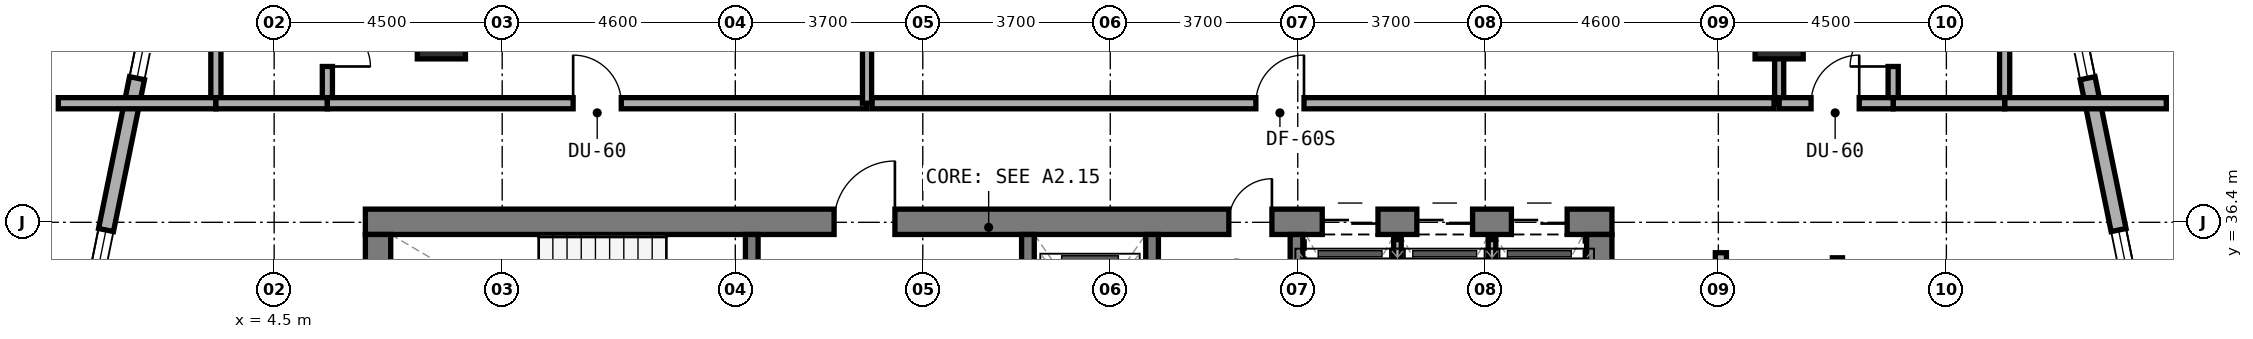
"""IFC4 building model, lengths in metres.
Left out: names, types, materials, properties, quantities, classifications, styles, units other than length and angle.
Written with IfcOpenShell. Run it as: python <this file> out.ifc"""

import sys

from ifc_helpers import new_model, si_unit, direction, frame, frame_2d, origin, origin_2d, place, context, subcontext, project, spatial, rectangle, extrude, element, fill, save


model = new_model("IFC4")
c1 = context("Model", 3, precision=1e-05, world=origin(), true_north=direction((0.0, 1.0)))
c2 = subcontext(c1, "Body", "Model", "MODEL_VIEW")
j1 = project(units=[si_unit("LENGTHUNIT", "METRE"), si_unit("PLANEANGLEUNIT", "RADIAN")], contexts=[c1])
p1 = place(None, origin())
s1 = spatial("IfcSite", under=j1, at=p1, CompositionType="ELEMENT")
p2 = place(p1, origin())
s2 = spatial("IfcBuilding", under=s1, at=p2, CompositionType="ELEMENT")
p3 = place(p2, frame((0.0, 0.0, 59.0)))
s3 = spatial("IfcBuildingStorey", under=s2, at=p3, CompositionType="ELEMENT", Elevation=59.0)
p4 = place(p3, frame((6.3, 36.41, 0.0), z_axis=(0.0, 0.0, 1.0), x_axis=(1.0, 0.0, 0.0)))
e1 = element("IfcWall", 1, at=p4, inside=s3, PredefinedType="SHEAR", context=c2, shape_type="SweptSolid", body=[
    extrude(rectangle(XDim=24.6, YDim=0.5, at=frame_2d((12.3, 0.0))), origin(), (0.0, 0.0, 1.0), 3.5),
])
p5 = place(p4, frame((9.25, 0.0, 0.0)))
e2 = element("IfcOpeningElement", 2, at=p5, cuts=e1, PredefinedType="OPENING", context=c2, shape_type="SweptSolid", body=[
    extrude(rectangle(XDim=1.2, YDim=2.15, at=frame_2d((0.6, 1.075))), frame((0.0, 0.26, 0.0), z_axis=(0.0, -1.0, 0.0), x_axis=(1.0, 0.0, 0.0)), (0.0, 0.0, 1.0), 0.52),
])
p6 = place(p4, frame((17.04, 0.0, 0.0)))
e3 = element("IfcOpeningElement", 3, at=p6, cuts=e1, PredefinedType="OPENING", context=c2, shape_type="SweptSolid", body=[
    extrude(rectangle(XDim=0.85, YDim=2.1, at=frame_2d((0.425, 1.05))), frame((0.0, 0.26, 0.0), z_axis=(0.0, -1.0, 0.0), x_axis=(1.0, 0.0, 0.0)), (0.0, 0.0, 1.0), 0.52),
])
p7 = place(p4, frame((18.883, 0.0, 0.0)))
e4 = element("IfcOpeningElement", 4, at=p7, cuts=e1, PredefinedType="OPENING", context=c2, shape_type="SweptSolid", body=[
    extrude(rectangle(XDim=1.1, YDim=2.15, at=frame_2d((0.55, 1.075))), frame((0.0, 0.26, 0.0), z_axis=(0.0, -1.0, 0.0), x_axis=(1.0, 0.0, 0.0)), (0.0, 0.0, 1.0), 0.52),
])
p8 = place(p4, frame((20.75, 0.0, 0.0)))
e5 = element("IfcOpeningElement", 5, at=p8, cuts=e1, PredefinedType="OPENING", context=c2, shape_type="SweptSolid", body=[
    extrude(rectangle(XDim=1.1, YDim=2.15, at=frame_2d((0.55, 1.075))), frame((0.0, 0.26, 0.0), z_axis=(0.0, -1.0, 0.0), x_axis=(1.0, 0.0, 0.0)), (0.0, 0.0, 1.0), 0.52),
])
p9 = place(p4, frame((22.616, 0.0, 0.0)))
e6 = element("IfcOpeningElement", 6, at=p9, cuts=e1, PredefinedType="OPENING", context=c2, shape_type="SweptSolid", body=[
    extrude(rectangle(XDim=1.1, YDim=2.15, at=frame_2d((0.55, 1.075))), frame((0.0, 0.26, 0.0), z_axis=(0.0, -1.0, 0.0), x_axis=(1.0, 0.0, 0.0)), (0.0, 0.0, 1.0), 0.52),
])
for number, where, z_axis, x_axis in (
    (7, (6.55, 33.0, 0.0), (0.0, 0.0, 1.0), (0.0, 1.0, 0.0)),
    (8, (30.65, 33.0, 0.0), (0.0, 0.0, 1.0), (0.0, 1.0, 0.0)),
):
    element("IfcWall", number, at=place(p3, frame(where, z_axis=z_axis, x_axis=x_axis)), inside=s3, PredefinedType="SHEAR", context=c2, shape_type="SweptSolid", body=[
        extrude(rectangle(XDim=3.16, YDim=0.5, at=frame_2d((1.58, 0.0))), origin(), (0.0, 0.0, 1.0), 3.5),
    ])
p10 = place(p3, frame((13.925, 33.0, 0.0), z_axis=(0.0, 0.0, 1.0), x_axis=(0.0, 1.0, 0.0)))
e9 = element("IfcWall", 9, at=p10, inside=s3, PredefinedType="STANDARD", context=c2, shape_type="SweptSolid", body=[
    extrude(rectangle(XDim=3.16, YDim=0.25, at=frame_2d((1.58, 0.0))), origin(), (0.0, 0.0, 1.0), 3.22),
])
p11 = place(p10, frame((0.98, 0.0, 0.0)))
e10 = element("IfcOpeningElement", 10, at=p11, cuts=e9, PredefinedType="OPENING", context=c2, shape_type="SweptSolid", body=[
    extrude(rectangle(XDim=1.1, YDim=2.15, at=frame_2d((0.55, 1.075))), frame((0.0, 0.135, 0.0), z_axis=(0.0, -1.0, 0.0), x_axis=(1.0, 0.0, 0.0)), (0.0, 0.0, 1.0), 0.27),
])
p12 = place(p3, frame((19.375, 33.0, 0.0), z_axis=(0.0, 0.0, 1.0), x_axis=(0.0, 1.0, 0.0)))
e11 = element("IfcWall", 11, at=p12, inside=s3, PredefinedType="STANDARD", context=c2, shape_type="SweptSolid", body=[
    extrude(rectangle(XDim=3.16, YDim=0.25, at=frame_2d((1.58, 0.0))), origin(), (0.0, 0.0, 1.0), 3.22),
])
p13 = place(p12, frame((0.98, 0.0, 0.0)))
e12 = element("IfcOpeningElement", 12, at=p13, cuts=e11, PredefinedType="OPENING", context=c2, shape_type="SweptSolid", body=[
    extrude(rectangle(XDim=1.1, YDim=2.15, at=frame_2d((0.55, 1.075))), frame((0.0, 0.135, 0.0), z_axis=(0.0, -1.0, 0.0), x_axis=(1.0, 0.0, 0.0)), (0.0, 0.0, 1.0), 0.27),
])
for number, where, z_axis, x_axis in (
    (13, (21.825, 33.0, 0.0), (0.0, 0.0, 1.0), (0.0, 1.0, 0.0)),
    (14, (24.675, 33.0, 0.0), (0.0, 0.0, 1.0), (0.0, 1.0, 0.0)),
):
    element("IfcWall", number, at=place(p3, frame(where, z_axis=z_axis, x_axis=x_axis)), inside=s3, PredefinedType="STANDARD", context=c2, shape_type="SweptSolid", body=[
        extrude(rectangle(XDim=3.16, YDim=0.25, at=frame_2d((1.58, 0.0))), origin(), (0.0, 0.0, 1.0), 3.22),
    ])
for number, where, z_axis, x_axis in (
    (15, (34.2, 40.2, 0.0), (0.0, 0.0, 1.0), (1.0, 0.0, 0.0)),
    (16, (7.8, 40.2, 0.0), (0.0, 0.0, 1.0), (1.0, 0.0, 0.0)),
):
    element("IfcColumn", number, at=place(p3, frame(where, z_axis=z_axis, x_axis=x_axis)), inside=s3, PredefinedType="COLUMN", context=c2, shape_type="SweptSolid", body=[
        extrude(rectangle(XDim=0.95, YDim=1.15, at=origin_2d()), origin(), (0.0, 0.0, 1.0), 3.5),
    ])
p14 = place(p3, frame((41.864, 31.516, 0.0), z_axis=(0.0, 0.0, 1.0), x_axis=(-0.199990901713, 0.979797754249, 0.0)))
e17 = element("IfcWall", 17, at=p14, inside=s3, PredefinedType="STANDARD", context=c2, shape_type="SweptSolid", body=[
    extrude(rectangle(XDim=10.065, YDim=0.3, at=frame_2d((5.033, 0.0))), origin(), (0.0, 0.0, 1.0), 3.22),
])
p15 = place(p14, frame((2.429, 0.0, 0.8)))
e18 = element("IfcOpeningElement", 18, at=p15, cuts=e17, PredefinedType="OPENING", context=c2, shape_type="SweptSolid", body=[
    extrude(rectangle(XDim=2.4, YDim=1.6, at=frame_2d((1.2, 0.8))), frame((0.0, 0.16, 0.0), z_axis=(0.0, -1.0, 0.0), x_axis=(1.0, 0.0, 0.0)), (0.0, 0.0, 1.0), 0.32),
])
p16 = place(p14, frame((7.887, 0.0, 0.85)))
e19 = element("IfcOpeningElement", 19, at=p16, cuts=e17, PredefinedType="OPENING", context=c2, shape_type="SweptSolid", body=[
    extrude(rectangle(XDim=1.8, YDim=1.5, at=frame_2d((0.9, 0.75))), frame((0.0, 0.16, 0.0), z_axis=(0.0, -1.0, 0.0), x_axis=(1.0, 0.0, 0.0)), (0.0, 0.0, 1.0), 0.32),
])
p17 = place(p3, frame((2.229, 41.378, 0.0), z_axis=(0.0, 0.0, 1.0), x_axis=(-0.199990901713, -0.979797754249, 0.0)))
e20 = element("IfcWall", 20, at=p17, inside=s3, PredefinedType="STANDARD", context=c2, shape_type="SweptSolid", body=[
    extrude(rectangle(XDim=10.065, YDim=0.3, at=frame_2d((5.033, 0.0))), origin(), (0.0, 0.0, 1.0), 3.22),
])
p18 = place(p17, frame((0.378, 0.0, 0.85)))
e21 = element("IfcOpeningElement", 21, at=p18, cuts=e20, PredefinedType="OPENING", context=c2, shape_type="SweptSolid", body=[
    extrude(rectangle(XDim=1.8, YDim=1.5, at=frame_2d((0.9, 0.75))), frame((0.0, 0.16, 0.0), z_axis=(0.0, -1.0, 0.0), x_axis=(1.0, 0.0, 0.0)), (0.0, 0.0, 1.0), 0.32),
])
p19 = place(p17, frame((5.236, 0.0, 0.8)))
e22 = element("IfcOpeningElement", 22, at=p19, cuts=e20, PredefinedType="OPENING", context=c2, shape_type="SweptSolid", body=[
    extrude(rectangle(XDim=2.4, YDim=1.6, at=frame_2d((1.2, 0.8))), frame((0.0, 0.16, 0.0), z_axis=(0.0, -1.0, 0.0), x_axis=(1.0, 0.0, 0.0)), (0.0, 0.0, 1.0), 0.32),
])
p20 = place(p3, frame((26.667, 33.1, 0.0), z_axis=(0.0, 0.0, 1.0), x_axis=(0.0, 1.0, 0.0)))
e23 = element("IfcWall", 23, at=p20, inside=s3, PredefinedType="PARTITIONING", context=c2, shape_type="SweptSolid", body=[
    extrude(rectangle(XDim=2.96, YDim=0.15, at=frame_2d((1.48, 0.0))), origin(), (0.0, 0.0, 1.0), 3.22),
])
p21 = place(p3, frame((28.533, 33.1, 0.0), z_axis=(0.0, 0.0, 1.0), x_axis=(0.0, 1.0, 0.0)))
e24 = element("IfcWall", 24, at=p21, inside=s3, PredefinedType="PARTITIONING", context=c2, shape_type="SweptSolid", body=[
    extrude(rectangle(XDim=2.96, YDim=0.15, at=frame_2d((1.48, 0.0))), origin(), (0.0, 0.0, 1.0), 2.495),
])
p22 = place(p3, frame((5.55, 38.85, 0.0), z_axis=(0.0, 0.0, 1.0), x_axis=(0.0, 1.0, 0.0)))
e25 = element("IfcWall", 25, at=p22, inside=s3, PredefinedType="PLUMBINGWALL", context=c2, shape_type="SweptSolid", body=[
    extrude(rectangle(XDim=2.1, YDim=0.2, at=frame_2d((1.05, 0.0))), origin(), (0.0, 0.0, 1.0), 3.22),
])
p23 = place(p22, frame((0.625, 0.0, 0.0)))
e26 = element("IfcOpeningElement", 26, at=p23, cuts=e25, PredefinedType="OPENING", context=c2, shape_type="SweptSolid", body=[
    extrude(rectangle(XDim=0.85, YDim=2.1, at=frame_2d((0.425, 1.05))), frame((0.0, 0.11, 0.0), z_axis=(0.0, -1.0, 0.0), x_axis=(1.0, 0.0, 0.0)), (0.0, 0.0, 1.0), 0.22),
])
p24 = place(p3, frame((3.35, 38.85, 0.0), z_axis=(0.0, 0.0, 1.0), x_axis=(0.0, 1.0, 0.0)))
e27 = element("IfcWall", 27, at=p24, inside=s3, PredefinedType="PLUMBINGWALL", context=c2, shape_type="SweptSolid", body=[
    extrude(rectangle(XDim=2.1, YDim=0.2, at=frame_2d((1.05, 0.0))), origin(), (0.0, 0.0, 1.0), 3.22),
])
p25 = place(p3, frame((0.24, 38.75, 0.0), z_axis=(0.0, 0.0, 1.0), x_axis=(1.0, 0.0, 0.0)))
e28 = element("IfcWall", 28, at=p25, inside=s3, PredefinedType="SOLIDWALL", context=c2, shape_type="SweptSolid", body=[
    extrude(rectangle(XDim=3.11, YDim=0.22, at=frame_2d((1.555, 0.0))), origin(), (0.0, 0.0, 1.0), 3.22),
])
p26 = place(p3, frame((3.35, 38.75, 0.0), z_axis=(0.0, 0.0, 1.0), x_axis=(1.0, 0.0, 0.0)))
e29 = element("IfcWall", 29, at=p26, inside=s3, PredefinedType="SOLIDWALL", context=c2, shape_type="SweptSolid", body=[
    extrude(rectangle(XDim=2.2, YDim=0.22, at=frame_2d((1.1, 0.0))), origin(), (0.0, 0.0, 1.0), 3.22),
])
p27 = place(p3, frame((5.55, 38.75, 0.0), z_axis=(0.0, 0.0, 1.0), x_axis=(1.0, 0.0, 0.0)))
e30 = element("IfcWall", 30, at=p27, inside=s3, PredefinedType="SOLIDWALL", context=c2, shape_type="SweptSolid", body=[
    extrude(rectangle(XDim=10.65, YDim=0.22, at=frame_2d((5.325, 0.0))), origin(), (0.0, 0.0, 1.0), 2.495),
])
p28 = place(p27, frame((4.85, 0.0, 0.0)))
e31 = element("IfcOpeningElement", 31, at=p28, cuts=e30, PredefinedType="OPENING", context=c2, shape_type="SweptSolid", body=[
    extrude(rectangle(XDim=0.95, YDim=2.1, at=frame_2d((0.475, 1.05))), frame((0.0, 0.12, 0.0), z_axis=(0.0, -1.0, 0.0), x_axis=(1.0, 0.0, 0.0)), (0.0, 0.0, 1.0), 0.24),
])
p29 = place(p3, frame((16.2, 38.75, 0.0), z_axis=(0.0, 0.0, 1.0), x_axis=(0.0, 1.0, 0.0)))
e32 = element("IfcWall", 32, at=p29, inside=s3, PredefinedType="SOLIDWALL", context=c2, shape_type="SweptSolid", body=[
    extrude(rectangle(XDim=8.19, YDim=0.18, at=frame_2d((4.095, 0.0))), origin(), (0.0, 0.0, 1.0), 2.495),
])
p30 = place(p3, frame((16.3, 38.75, 0.0), z_axis=(0.0, 0.0, 1.0), x_axis=(1.0, 0.0, 0.0)))
e33 = element("IfcWall", 33, at=p30, inside=s3, PredefinedType="SOLIDWALL", context=c2, shape_type="SweptSolid", body=[
    extrude(rectangle(XDim=17.8, YDim=0.22, at=frame_2d((8.9, 0.0))), origin(), (0.0, 0.0, 1.0), 2.495),
])
p31 = place(p30, frame((7.573, 0.0, 0.0)))
e34 = element("IfcOpeningElement", 34, at=p31, cuts=e33, PredefinedType="OPENING", context=c2, shape_type="SweptSolid", body=[
    extrude(rectangle(XDim=0.95, YDim=2.1, at=frame_2d((0.475, 1.05))), frame((0.0, 0.12, 0.0), z_axis=(0.0, -1.0, 0.0), x_axis=(1.0, 0.0, 0.0)), (0.0, 0.0, 1.0), 0.24),
])
p32 = place(p3, frame((34.2, 38.75, 0.0), z_axis=(0.0, 0.0, 1.0), x_axis=(0.0, 1.0, 0.0)))
e35 = element("IfcWall", 35, at=p32, inside=s3, PredefinedType="SOLIDWALL", context=c2, shape_type="SweptSolid", body=[
    extrude(rectangle(XDim=6.674, YDim=0.18, at=frame_2d((3.337, 0.0))), origin(), (0.0, 0.0, 1.0), 2.495),
])
p33 = place(p3, frame((36.45, 38.85, 0.0), z_axis=(0.0, 0.0, 1.0), x_axis=(0.0, 1.0, 0.0)))
e36 = element("IfcWall", 36, at=p33, inside=s3, PredefinedType="PLUMBINGWALL", context=c2, shape_type="SweptSolid", body=[
    extrude(rectangle(XDim=2.1, YDim=0.2, at=frame_2d((1.05, 0.0))), origin(), (0.0, 0.0, 1.0), 3.22),
])
p34 = place(p33, frame((0.625, 0.0, 0.0)))
e37 = element("IfcOpeningElement", 37, at=p34, cuts=e36, PredefinedType="OPENING", context=c2, shape_type="SweptSolid", body=[
    extrude(rectangle(XDim=0.85, YDim=2.1, at=frame_2d((0.425, 1.05))), frame((0.0, 0.11, 0.0), z_axis=(0.0, -1.0, 0.0), x_axis=(1.0, 0.0, 0.0)), (0.0, 0.0, 1.0), 0.22),
])
p35 = place(p3, frame((38.65, 38.85, 0.0), z_axis=(0.0, 0.0, 1.0), x_axis=(0.0, 1.0, 0.0)))
e38 = element("IfcWall", 38, at=p35, inside=s3, PredefinedType="PLUMBINGWALL", context=c2, shape_type="SweptSolid", body=[
    extrude(rectangle(XDim=2.1, YDim=0.2, at=frame_2d((1.05, 0.0))), origin(), (0.0, 0.0, 1.0), 3.22),
])
p36 = place(p3, frame((38.65, 38.75, 0.0), z_axis=(0.0, 0.0, 1.0), x_axis=(1.0, 0.0, 0.0)))
e39 = element("IfcWall", 39, at=p36, inside=s3, PredefinedType="SOLIDWALL", context=c2, shape_type="SweptSolid", body=[
    extrude(rectangle(XDim=3.19, YDim=0.22, at=frame_2d((1.595, 0.0))), origin(), (0.0, 0.0, 1.0), 3.22),
])
p37 = place(p3, frame((36.45, 38.75, 0.0), z_axis=(0.0, 0.0, 1.0), x_axis=(1.0, 0.0, 0.0)))
e40 = element("IfcWall", 40, at=p37, inside=s3, PredefinedType="SOLIDWALL", context=c2, shape_type="SweptSolid", body=[
    extrude(rectangle(XDim=2.2, YDim=0.22, at=frame_2d((1.1, 0.0))), origin(), (0.0, 0.0, 1.0), 3.22),
])
p38 = place(p3, frame((34.2, 38.75, 0.0), z_axis=(0.0, 0.0, 1.0), x_axis=(1.0, 0.0, 0.0)))
e41 = element("IfcWall", 41, at=p38, inside=s3, PredefinedType="SOLIDWALL", context=c2, shape_type="SweptSolid", body=[
    extrude(rectangle(XDim=2.25, YDim=0.22, at=frame_2d((1.125, 0.0))), origin(), (0.0, 0.0, 1.0), 2.495),
])
p39 = place(p38, frame((0.63, 0.0, 0.0)))
e42 = element("IfcOpeningElement", 42, at=p39, cuts=e41, PredefinedType="OPENING", context=c2, shape_type="SweptSolid", body=[
    extrude(rectangle(XDim=0.95, YDim=2.1, at=frame_2d((0.475, 1.05))), frame((0.0, 0.12, 0.0), z_axis=(0.0, -1.0, 0.0), x_axis=(1.0, 0.0, 0.0)), (0.0, 0.0, 1.0), 0.24),
])
p40 = place(p3, frame((35.35, 33.7, 0.0), z_axis=(0.0, 0.0, 1.0), x_axis=(0.0, 1.0, 0.0)))
e43 = element("IfcWall", 43, at=p40, inside=s3, PredefinedType="PLUMBINGWALL", context=c2, shape_type="SweptSolid", body=[
    extrude(rectangle(XDim=2.0, YDim=0.2, at=frame_2d((1.0, 0.0))), origin(), (0.0, 0.0, 1.0), 2.745),
])
p41 = place(p3, frame((33.05, 33.6, 0.0), z_axis=(0.0, 0.0, 1.0), x_axis=(0.0, 1.0, 0.0)))
e44 = element("IfcWall", 44, at=p41, inside=s3, PredefinedType="SOLIDWALL", context=c2, shape_type="SweptSolid", body=[
    extrude(rectangle(XDim=2.2, YDim=0.22, at=frame_2d((1.1, 0.0))), origin(), (0.0, 0.0, 1.0), 3.22),
])
p42 = place(p15, origin())
e45 = element("IfcWindow", 45, at=p42, inside=s3, PartitioningType="SINGLE_PANEL", PredefinedType="WINDOW", context=c2, shape_type="SweptSolid", body=[
    extrude(rectangle(XDim=2.4, YDim=1.6, at=frame_2d((1.2, 0.8))), frame((0.0, 0.03, 0.0), z_axis=(0.0, -1.0, 0.0), x_axis=(1.0, 0.0, 0.0)), (0.0, 0.0, 1.0), 0.06),
])
fill(e18, e45)
p43 = place(p16, origin())
e46 = element("IfcWindow", 46, at=p43, inside=s3, PartitioningType="SINGLE_PANEL", PredefinedType="WINDOW", context=c2, shape_type="SweptSolid", body=[
    extrude(rectangle(XDim=1.8, YDim=1.5, at=frame_2d((0.9, 0.75))), frame((0.0, 0.03, 0.0), z_axis=(0.0, -1.0, 0.0), x_axis=(1.0, 0.0, 0.0)), (0.0, 0.0, 1.0), 0.06),
])
fill(e19, e46)
p44 = place(p18, origin())
e47 = element("IfcWindow", 47, at=p44, inside=s3, PartitioningType="SINGLE_PANEL", PredefinedType="WINDOW", context=c2, shape_type="SweptSolid", body=[
    extrude(rectangle(XDim=1.8, YDim=1.5, at=frame_2d((0.9, 0.75))), frame((0.0, 0.03, 0.0), z_axis=(0.0, -1.0, 0.0), x_axis=(1.0, 0.0, 0.0)), (0.0, 0.0, 1.0), 0.06),
])
fill(e21, e47)
p45 = place(p19, origin())
e48 = element("IfcWindow", 48, at=p45, inside=s3, PartitioningType="SINGLE_PANEL", PredefinedType="WINDOW", context=c2, shape_type="SweptSolid", body=[
    extrude(rectangle(XDim=2.4, YDim=1.6, at=frame_2d((1.2, 0.8))), frame((0.0, 0.03, 0.0), z_axis=(0.0, -1.0, 0.0), x_axis=(1.0, 0.0, 0.0)), (0.0, 0.0, 1.0), 0.06),
])
fill(e22, e48)
p46 = place(p5, origin())
e49 = element("IfcDoor", 49, at=p46, inside=s3, OperationType="SINGLE_SWING_RIGHT", PredefinedType="DOOR", context=c2, shape_type="SweptSolid", body=[
    extrude(rectangle(XDim=1.2, YDim=2.15, at=frame_2d((0.6, 1.075))), frame((0.0, 0.025, 0.0), z_axis=(0.0, -1.0, 0.0), x_axis=(1.0, 0.0, 0.0)), (0.0, 0.0, 1.0), 0.05),
])
fill(e2, e49)
p47 = place(p6, origin())
e50 = element("IfcDoor", 50, at=p47, inside=s3, OperationType="SINGLE_SWING_RIGHT", PredefinedType="DOOR", context=c2, shape_type="SweptSolid", body=[
    extrude(rectangle(XDim=0.85, YDim=2.1, at=frame_2d((0.425, 1.05))), frame((0.0, 0.025, 0.0), z_axis=(0.0, -1.0, 0.0), x_axis=(1.0, 0.0, 0.0)), (0.0, 0.0, 1.0), 0.05),
])
fill(e3, e50)
p48 = place(p7, origin())
e51 = element("IfcDoor", 51, at=p48, inside=s3, OperationType="DOUBLE_DOOR_SLIDING", PredefinedType="DOOR", context=c2, shape_type="SweptSolid", body=[
    extrude(rectangle(XDim=1.1, YDim=2.15, at=frame_2d((0.55, 1.075))), frame((0.0, 0.025, 0.0), z_axis=(0.0, -1.0, 0.0), x_axis=(1.0, 0.0, 0.0)), (0.0, 0.0, 1.0), 0.05),
])
fill(e4, e51)
p49 = place(p8, origin())
e52 = element("IfcDoor", 52, at=p49, inside=s3, OperationType="DOUBLE_DOOR_SLIDING", PredefinedType="DOOR", context=c2, shape_type="SweptSolid", body=[
    extrude(rectangle(XDim=1.1, YDim=2.15, at=frame_2d((0.55, 1.075))), frame((0.0, 0.025, 0.0), z_axis=(0.0, -1.0, 0.0), x_axis=(1.0, 0.0, 0.0)), (0.0, 0.0, 1.0), 0.05),
])
fill(e5, e52)
p50 = place(p9, origin())
e53 = element("IfcDoor", 53, at=p50, inside=s3, OperationType="DOUBLE_DOOR_SLIDING", PredefinedType="DOOR", context=c2, shape_type="SweptSolid", body=[
    extrude(rectangle(XDim=1.1, YDim=2.15, at=frame_2d((0.55, 1.075))), frame((0.0, 0.025, 0.0), z_axis=(0.0, -1.0, 0.0), x_axis=(1.0, 0.0, 0.0)), (0.0, 0.0, 1.0), 0.05),
])
fill(e6, e53)
p51 = place(p23, frame((0.85, 0.0, 0.0), z_axis=(0.0, 0.0, 1.0), x_axis=(-1.0, 0.0, 0.0)))
e54 = element("IfcDoor", 54, at=p51, inside=s3, OperationType="SINGLE_SWING_RIGHT", PredefinedType="DOOR", context=c2, shape_type="SweptSolid", body=[
    extrude(rectangle(XDim=0.85, YDim=2.1, at=frame_2d((0.425, 1.05))), frame((0.0, 0.025, 0.0), z_axis=(0.0, -1.0, 0.0), x_axis=(1.0, 0.0, 0.0)), (0.0, 0.0, 1.0), 0.05),
])
fill(e26, e54)
p52 = place(p28, origin())
e55 = element("IfcDoor", 55, at=p52, inside=s3, OperationType="SINGLE_SWING_LEFT", PredefinedType="DOOR", context=c2, shape_type="SweptSolid", body=[
    extrude(rectangle(XDim=0.95, YDim=2.1, at=frame_2d((0.475, 1.05))), frame((0.0, 0.025, 0.0), z_axis=(0.0, -1.0, 0.0), x_axis=(1.0, 0.0, 0.0)), (0.0, 0.0, 1.0), 0.05),
])
fill(e31, e55)
p53 = place(p31, origin())
e56 = element("IfcDoor", 56, at=p53, inside=s3, OperationType="SINGLE_SWING_RIGHT", PredefinedType="DOOR", context=c2, shape_type="SweptSolid", body=[
    extrude(rectangle(XDim=0.95, YDim=2.1, at=frame_2d((0.475, 1.05))), frame((0.0, 0.025, 0.0), z_axis=(0.0, -1.0, 0.0), x_axis=(1.0, 0.0, 0.0)), (0.0, 0.0, 1.0), 0.05),
])
fill(e34, e56)
p54 = place(p34, origin())
e57 = element("IfcDoor", 57, at=p54, inside=s3, OperationType="SINGLE_SWING_LEFT", PredefinedType="DOOR", context=c2, shape_type="SweptSolid", body=[
    extrude(rectangle(XDim=0.85, YDim=2.1, at=frame_2d((0.425, 1.05))), frame((0.0, 0.025, 0.0), z_axis=(0.0, -1.0, 0.0), x_axis=(1.0, 0.0, 0.0)), (0.0, 0.0, 1.0), 0.05),
])
fill(e37, e57)
p55 = place(p39, origin())
e58 = element("IfcDoor", 58, at=p55, inside=s3, OperationType="SINGLE_SWING_RIGHT", PredefinedType="DOOR", context=c2, shape_type="SweptSolid", body=[
    extrude(rectangle(XDim=0.95, YDim=2.1, at=frame_2d((0.475, 1.05))), frame((0.0, 0.025, 0.0), z_axis=(0.0, -1.0, 0.0), x_axis=(1.0, 0.0, 0.0)), (0.0, 0.0, 1.0), 0.05),
])
fill(e42, e58)
save(model, sys.argv[1])
